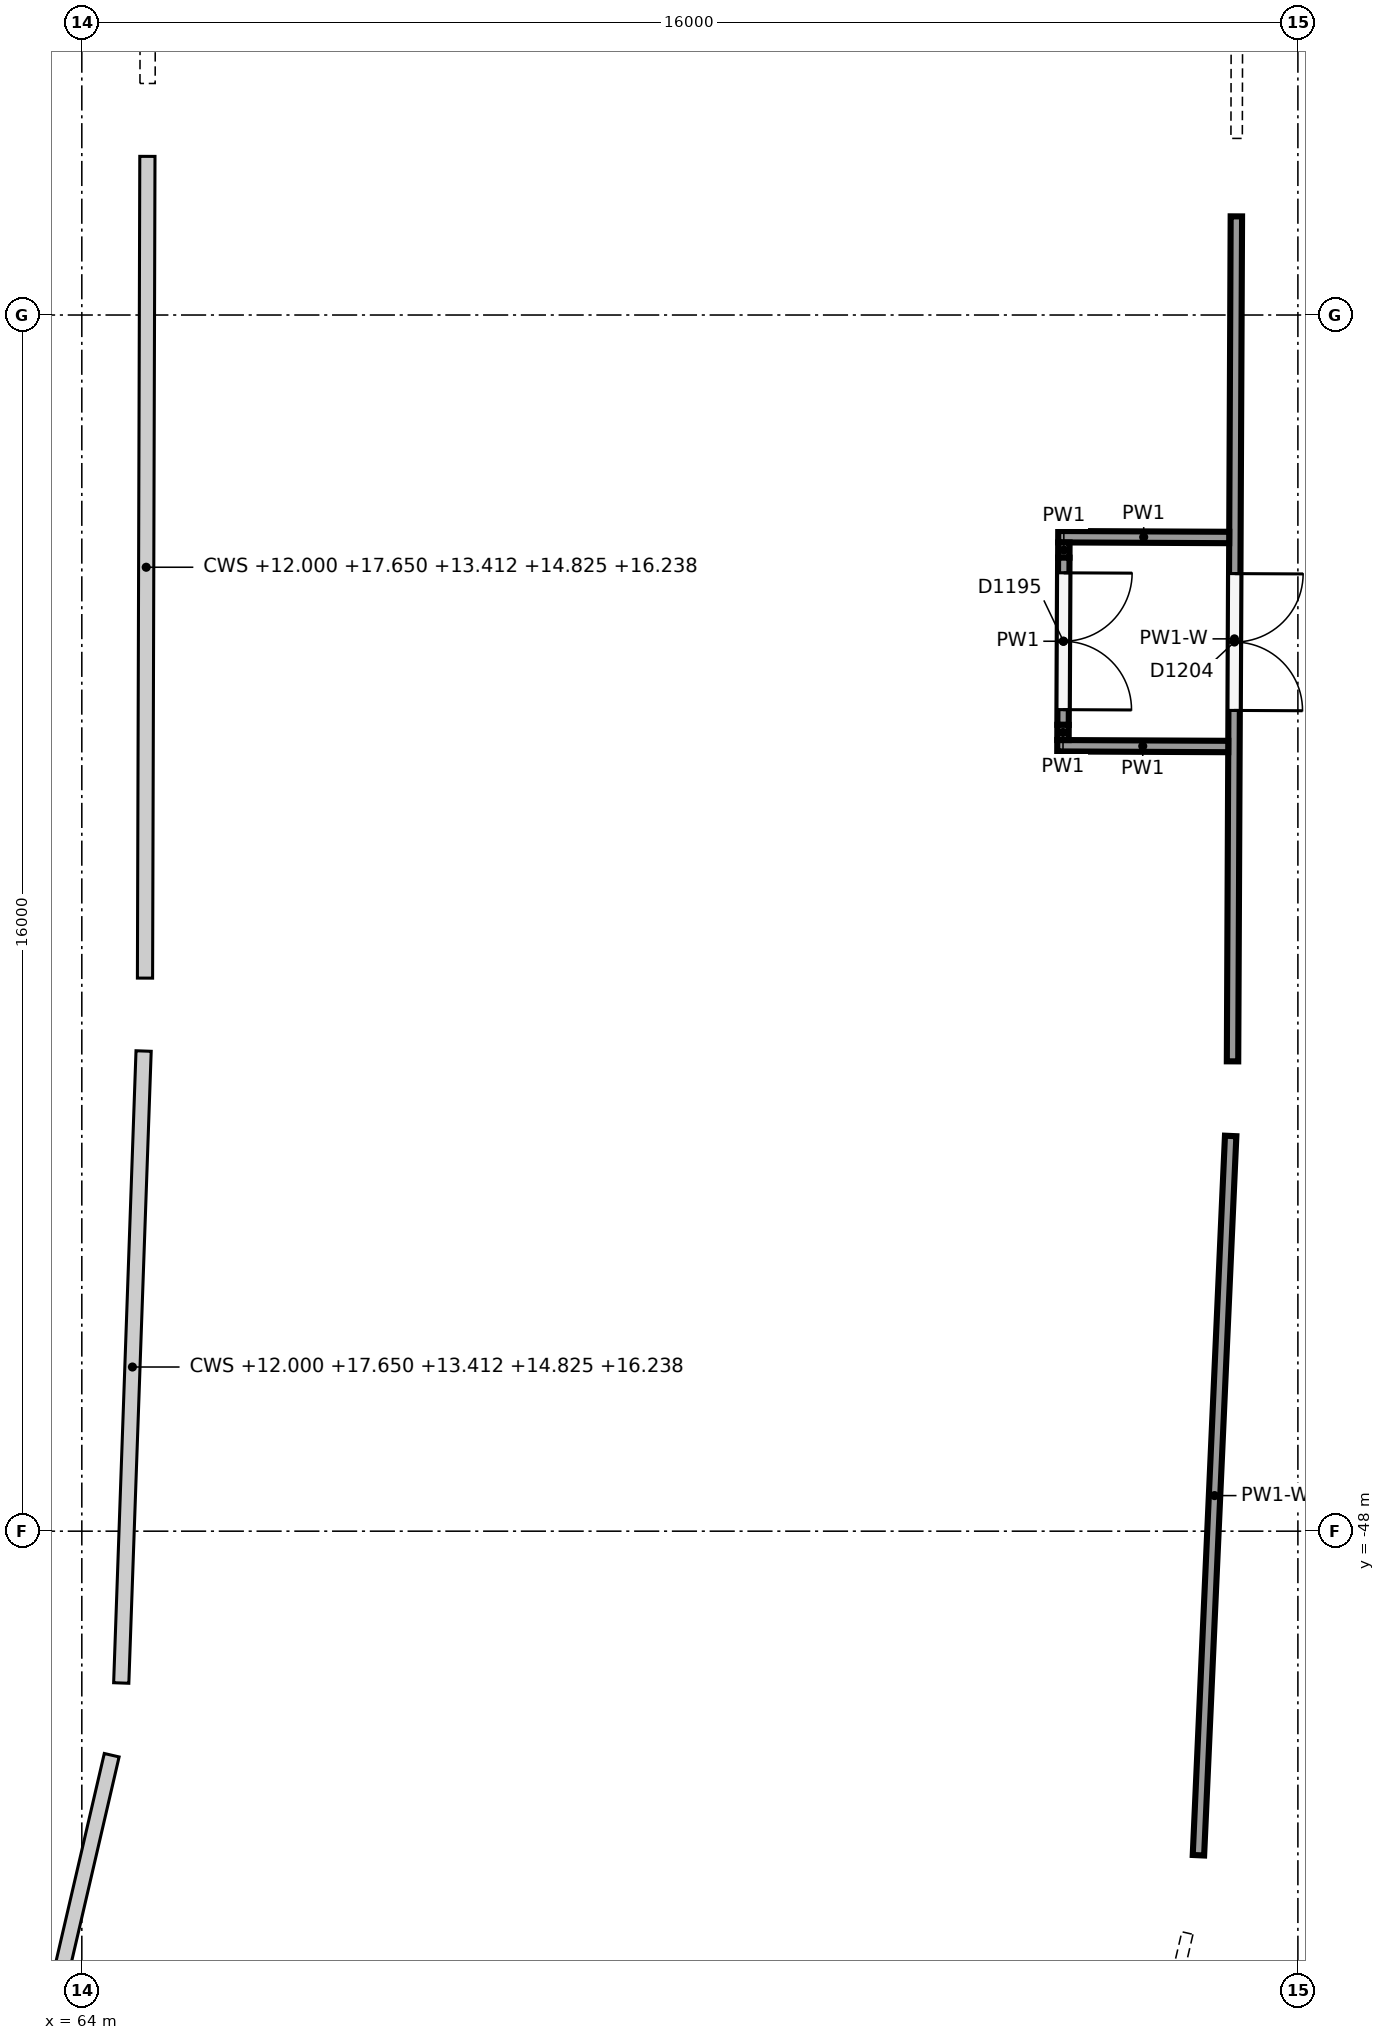
"""IFC4 building model, lengths in metres.
Left out: names, types, materials, properties, quantities, classifications, styles, units other than length and angle.
Written with IfcOpenShell. Run it as: python <this file> out.ifc"""

import sys

from ifc_helpers import new_model, si_unit, direction, frame, frame_2d, origin, origin_2d, place, context, subcontext, project, spatial, rectangle, circle, extrude, element, fill, save


model = new_model("IFC4")
c1 = context("Model", 3, precision=1e-05, world=origin(), true_north=direction((0.0, 1.0)))
c2 = subcontext(c1, "Body", "Model", "MODEL_VIEW")
j1 = project(units=[si_unit("LENGTHUNIT", "METRE"), si_unit("PLANEANGLEUNIT", "RADIAN")], contexts=[c1])
p1 = place(None, origin())
s1 = spatial("IfcSite", under=j1, at=p1, CompositionType="ELEMENT")
p2 = place(p1, origin())
s2 = spatial("IfcBuilding", under=s1, at=p2, CompositionType="ELEMENT")
p3 = place(p2, frame((0.0, 0.0, 12.0)))
s3 = spatial("IfcBuildingStorey", under=s2, at=p3, CompositionType="ELEMENT", Elevation=12.0)
p4 = place(p3, frame((63.218, -50.273, 0.0), z_axis=(0.0, 0.0, 1.0), x_axis=(1.0, 0.0, 0.0)))
e1 = element("IfcColumn", 1, at=p4, inside=s3, PredefinedType="COLUMN", context=c2, shape_type="SweptSolid", body=[
    extrude(circle(Radius=0.45, at=origin_2d()), origin(), (0.0, 0.0, 1.0), 3.05),
])
p5 = place(p3, frame((64.502, -50.48, 0.0), z_axis=(0.0, 0.0, 1.0), x_axis=(1.0, 0.0, 0.0)))
e2 = element("IfcColumn", 2, at=p5, inside=s3, PredefinedType="COLUMN", context=c2, shape_type="SweptSolid", body=[
    extrude(circle(Radius=0.4, at=origin_2d()), origin(), (0.0, 0.0, 1.0), 4.479),
])
p6 = place(p3, frame((72.992, -51.847, 0.0), z_axis=(0.0, 0.0, 1.0), x_axis=(1.0, 0.0, 0.0)))
e3 = element("IfcColumn", 3, at=p6, inside=s3, PredefinedType="COLUMN", context=c2, shape_type="SweptSolid", body=[
    extrude(circle(Radius=0.45, at=origin_2d()), origin(), (0.0, 0.0, 1.0), 6.0),
])
p7 = place(p3, frame((63.534, -41.104, 0.0), z_axis=(0.0, 0.0, 1.0), x_axis=(1.0, 0.0, 0.0)))
e4 = element("IfcColumn", 4, at=p7, inside=s3, PredefinedType="COLUMN", context=c2, shape_type="SweptSolid", body=[
    extrude(circle(Radius=0.45, at=origin_2d()), origin(), (0.0, 0.0, 1.0), 3.045),
])
p8 = place(p3, frame((64.83, -41.204, 0.0), z_axis=(0.0, 0.0, 1.0), x_axis=(1.0, 0.0, 0.0)))
e5 = element("IfcColumn", 5, at=p8, inside=s3, PredefinedType="COLUMN", context=c2, shape_type="SweptSolid", body=[
    extrude(circle(Radius=0.4, at=origin_2d()), origin(), (0.0, 0.0, 1.0), 4.475),
])
p9 = place(p3, frame((73.405, -41.862, 0.0), z_axis=(0.0, 0.0, 1.0), x_axis=(1.0, 0.0, 0.0)))
e6 = element("IfcColumn", 6, at=p9, inside=s3, PredefinedType="COLUMN", context=c2, shape_type="SweptSolid", body=[
    extrude(circle(Radius=0.45, at=origin_2d()), origin(), (0.0, 0.0, 1.0), 6.0),
])
p10 = place(p3, frame((63.566, -29.362, 0.0), z_axis=(0.0, 0.0, 1.0), x_axis=(1.0, 0.0, 0.0)))
e7 = element("IfcColumn", 7, at=p10, inside=s3, PredefinedType="COLUMN", context=c2, shape_type="SweptSolid", body=[
    extrude(circle(Radius=0.45, at=origin_2d()), origin(), (0.0, 0.0, 1.0), 2.968),
])
p11 = place(p3, frame((64.864, -29.433, 0.0), z_axis=(0.0, 0.0, 1.0), x_axis=(1.0, 0.0, 0.0)))
e8 = element("IfcColumn", 8, at=p11, inside=s3, PredefinedType="COLUMN", context=c2, shape_type="SweptSolid", body=[
    extrude(circle(Radius=0.4, at=origin_2d()), origin(), (0.0, 0.0, 1.0), 4.398),
])
p12 = place(p3, frame((73.451, -29.904, 0.0), z_axis=(0.0, 0.0, 1.0), x_axis=(1.0, 0.0, 0.0)))
e9 = element("IfcColumn", 9, at=p12, inside=s3, PredefinedType="COLUMN", context=c2, shape_type="SweptSolid", body=[
    extrude(circle(Radius=0.45, at=origin_2d()), origin(), (0.0, 0.0, 1.0), 6.0),
])
p13 = place(p3, frame((79.19, -30.702, 0.0), z_axis=(0.0, 0.0, 1.0), x_axis=(-0.004546006523, -0.999989666859, 0.0)))
e10 = element("IfcWall", 10, at=p13, inside=s3, PredefinedType="PARTITIONING", context=c2, shape_type="SweptSolid", body=[
    extrude(rectangle(XDim=11.117, YDim=0.15, at=frame_2d((5.558, 0.0))), origin(), (0.0, 0.0, 1.0), 3.973),
])
p14 = place(p13, frame((4.7, 0.0, 0.0)))
e11 = element("IfcOpeningElement", 11, at=p14, cuts=e10, PredefinedType="OPENING", context=c2, shape_type="SweptSolid", body=[
    extrude(rectangle(XDim=1.8, YDim=2.1, at=frame_2d((0.9, 1.05))), frame((0.0, 0.085, 0.0), z_axis=(0.0, -1.0, 0.0), x_axis=(1.0, 0.0, 0.0)), (0.0, 0.0, 1.0), 0.17),
])
p15 = place(p3, frame((79.115, -42.8, 0.0), z_axis=(0.0, 0.0, 1.0), x_axis=(-0.044768155876, -0.99899740351, 0.0)))
e12 = element("IfcWall", 12, at=p15, inside=s3, PredefinedType="PARTITIONING", context=c2, shape_type="SweptSolid", body=[
    extrude(rectangle(XDim=9.473, YDim=0.15, at=frame_2d((4.736, 0.0))), origin(), (0.0, 0.0, 1.0), 3.973),
])
p16 = place(p3, frame((79.219, -18.845, 0.0), z_axis=(0.0, 0.0, 1.0), x_axis=(-0.002254023351, -0.999997459686, 0.0)))
e13 = element("IfcWall", 13, at=p16, inside=s3, PredefinedType="PARTITIONING", context=c2, shape_type="SweptSolid", body=[
    extrude(rectangle(XDim=10.831, YDim=0.15, at=frame_2d((5.416, 0.0))), origin(), (0.0, 0.0, 1.0), 4.124),
])
p17 = place(p3, frame((78.546, -53.287, 0.0), z_axis=(0.0, 0.0, 1.0), x_axis=(-0.226958808722, -0.973904358314, 0.0)))
e14 = element("IfcWall", 14, at=p17, inside=s3, PredefinedType="PARTITIONING", context=c2, shape_type="SweptSolid", body=[
    extrude(rectangle(XDim=7.838, YDim=0.15, at=frame_2d((3.919, 0.0))), origin(), (0.0, 0.0, 1.0), 4.11),
])
p18 = place(p17, frame((3.2, 0.0, 0.0)))
e15 = element("IfcOpeningElement", 15, at=p18, cuts=e14, PredefinedType="OPENING", context=c2, shape_type="SweptSolid", body=[
    extrude(rectangle(XDim=1.2, YDim=2.1, at=frame_2d((0.6, 1.05))), frame((0.0, 0.085, 0.0), z_axis=(0.0, -1.0, 0.0), x_axis=(1.0, 0.0, 0.0)), (0.0, 0.0, 1.0), 0.17),
])
p19 = place(p3, frame((81.513, -47.012, 0.0), z_axis=(0.0, 0.0, 1.0), x_axis=(-0.111965089533, -0.993712140776, 0.0)))
e16 = element("IfcWall", 16, at=p19, inside=s3, PredefinedType="PARTITIONING", context=c2, shape_type="SweptSolid", body=[
    extrude(rectangle(XDim=13.89, YDim=0.15, at=frame_2d((6.945, 0.0))), origin(), (0.0, 0.0, 1.0), 4.55),
])
p20 = place(p19, frame((7.75, 0.0, 0.0)))
e17 = element("IfcOpeningElement", 17, at=p20, cuts=e16, PredefinedType="OPENING", context=c2, shape_type="SweptSolid", body=[
    extrude(rectangle(XDim=1.8, YDim=2.1, at=frame_2d((0.9, 1.05))), frame((0.0, 0.085, 0.0), z_axis=(0.0, -1.0, 0.0), x_axis=(1.0, 0.0, 0.0)), (0.0, 0.0, 1.0), 0.17),
])
for number, where, z_axis, x_axis in (
    (18, (79.096, -34.927, 0.0), (0.0, 0.0, 1.0), (-1.0, 0.005, 0.0)),
    (19, (79.084, -37.677, 0.0), (0.0, 0.0, 1.0), (-1.0, 0.005, 0.0)),
):
    element("IfcWall", number, at=place(p3, frame(where, z_axis=z_axis, x_axis=x_axis)), inside=s3, PredefinedType="PARTITIONING", context=c2, shape_type="SweptSolid", body=[
        extrude(rectangle(XDim=2.25, YDim=0.15, at=frame_2d((1.125, 0.0))), origin(), (0.0, 0.0, 1.0), 5.65),
    ])
p21 = place(p3, frame((76.921, -34.992, 0.0), z_axis=(0.0, 0.0, 1.0), x_axis=(-0.003662979089, -0.99999329127, 0.0)))
e20 = element("IfcWall", 20, at=p21, inside=s3, PredefinedType="PARTITIONING", context=c2, shape_type="SweptSolid", body=[
    extrude(rectangle(XDim=0.2, YDim=0.15, at=frame_2d((0.1, 0.0))), origin(), (0.0, 0.0, 1.0), 5.65),
])
p22 = place(p3, frame((76.92, -35.192, 0.0), z_axis=(0.0, 0.0, 1.0), x_axis=(-0.004549947354, -0.999989648936, 0.0)))
e21 = element("IfcWall", 21, at=p22, inside=s3, PredefinedType="PARTITIONING", context=c2, shape_type="SweptSolid", body=[
    extrude(rectangle(XDim=2.2, YDim=0.15, at=frame_2d((1.1, 0.0))), origin(), (0.0, 0.0, 1.0), 5.65),
])
p23 = place(p22, frame((0.2, 0.0, 0.0)))
e22 = element("IfcOpeningElement", 22, at=p23, cuts=e21, PredefinedType="OPENING", context=c2, shape_type="SweptSolid", body=[
    extrude(rectangle(XDim=1.8, YDim=2.1, at=frame_2d((0.9, 1.05))), frame((0.0, 0.085, 0.0), z_axis=(0.0, -1.0, 0.0), x_axis=(1.0, 0.0, 0.0)), (0.0, 0.0, 1.0), 0.17),
])
p24 = place(p3, frame((76.91, -37.392, 0.0), z_axis=(0.0, 0.0, 1.0), x_axis=(-0.004883946635, -0.999988073462, 0.0)))
e23 = element("IfcWall", 23, at=p24, inside=s3, PredefinedType="PARTITIONING", context=c2, shape_type="SweptSolid", body=[
    extrude(rectangle(XDim=0.2, YDim=0.15, at=frame_2d((0.1, 0.0))), origin(), (0.0, 0.0, 1.0), 5.65),
])
p25 = place(p14, origin())
e24 = element("IfcDoor", 24, at=p25, inside=s3, OperationType="DOUBLE_DOOR_SINGLE_SWING", PredefinedType="DOOR", context=c2, shape_type="SweptSolid", body=[
    extrude(rectangle(XDim=1.8, YDim=2.1, at=frame_2d((0.9, 1.05))), frame((0.0, 0.025, 0.0), z_axis=(0.0, -1.0, 0.0), x_axis=(1.0, 0.0, 0.0)), (0.0, 0.0, 1.0), 0.05),
])
fill(e11, e24)
p26 = place(p23, origin())
e25 = element("IfcDoor", 25, at=p26, inside=s3, OperationType="DOUBLE_DOOR_SINGLE_SWING", PredefinedType="DOOR", context=c2, shape_type="SweptSolid", body=[
    extrude(rectangle(XDim=1.8, YDim=2.1, at=frame_2d((0.9, 1.05))), frame((0.0, 0.025, 0.0), z_axis=(0.0, -1.0, 0.0), x_axis=(1.0, 0.0, 0.0)), (0.0, 0.0, 1.0), 0.05),
])
fill(e22, e25)
save(model, sys.argv[1])
